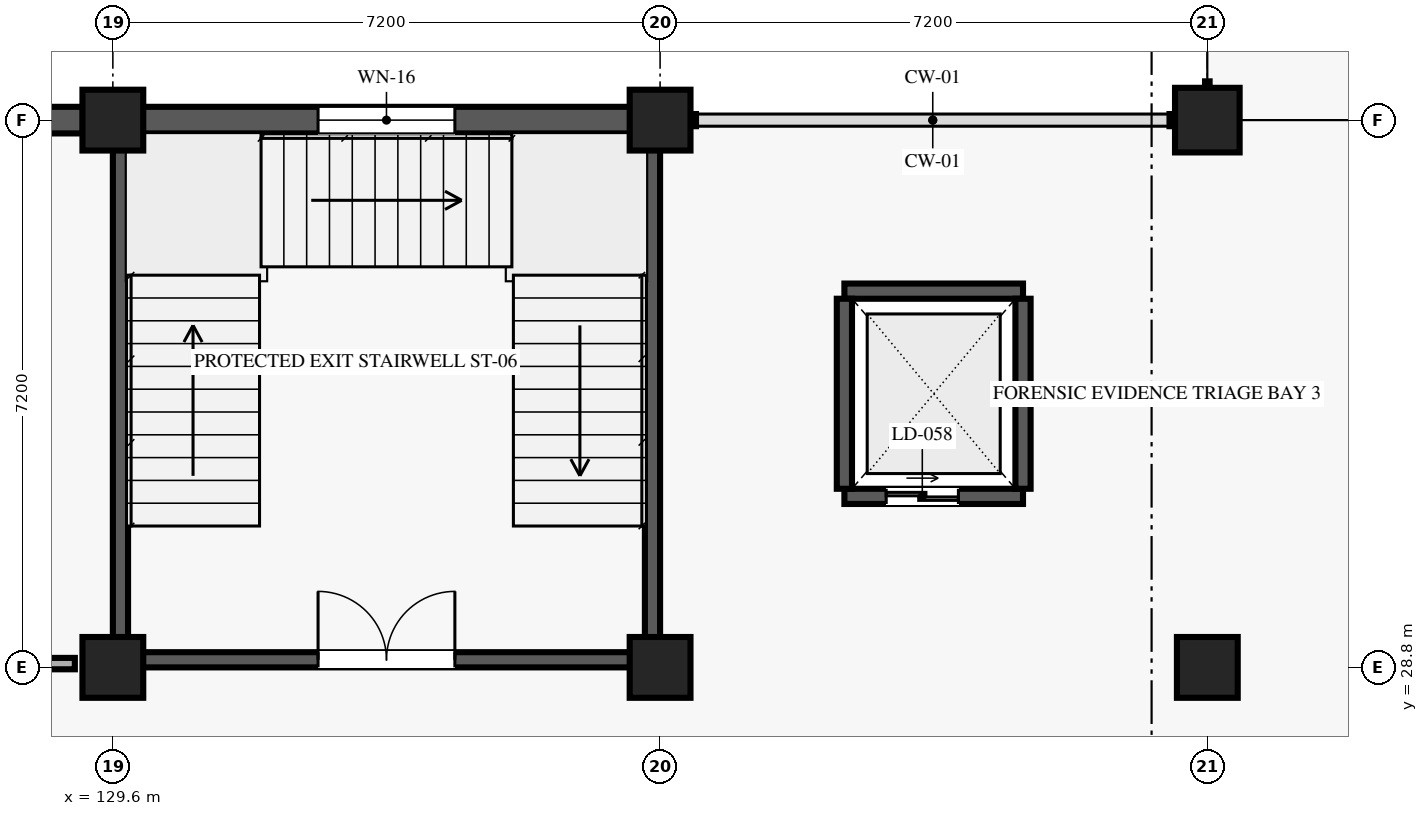
"""IFC4 building model, lengths in metres.
Left out: names, types, materials, properties, quantities, classifications, styles, units other than length and angle.
Written with IfcOpenShell. Run it as: python <this file> out.ifc"""

import sys

from ifc_helpers import new_model, si_unit, direction, frame, frame_2d, origin, origin_2d, place, context, subcontext, project, spatial, rectangle, extrude, element, fill, save


model = new_model("IFC4")
c1 = context("Model", 3, precision=1e-05, world=origin(), true_north=direction((0.0, 1.0)))
c2 = subcontext(c1, "Body", "Model", "MODEL_VIEW")
j1 = project(units=[si_unit("LENGTHUNIT", "METRE"), si_unit("PLANEANGLEUNIT", "RADIAN")], contexts=[c1])
p1 = place(None, origin())
s1 = spatial("IfcSite", under=j1, at=p1, CompositionType="ELEMENT")
p2 = place(p1, origin())
s2 = spatial("IfcBuilding", under=s1, at=p2, CompositionType="ELEMENT")
p3 = place(p2, origin())
s3 = spatial("IfcBuildingStorey", under=s2, at=p3, CompositionType="ELEMENT", Elevation=0.0)
for number, where, z_axis, x_axis in (
    (1, (129.6, 28.8, 0.0), (0.0, 0.0, 1.0), (1.0, 0.0, 0.0)),
    (2, (129.6, 36.0, 0.0), (0.0, 0.0, 1.0), (1.0, 0.0, 0.0)),
    (3, (136.8, 28.8, 0.0), (0.0, 0.0, 1.0), (1.0, 0.0, 0.0)),
    (4, (136.8, 36.0, 0.0), (0.0, 0.0, 1.0), (1.0, 0.0, 0.0)),
    (5, (144.0, 28.8, 0.0), (0.0, 0.0, 1.0), (1.0, 0.0, 0.0)),
):
    element("IfcColumn", number, at=place(p3, frame(where, z_axis=z_axis, x_axis=x_axis)), inside=s3, PredefinedType="COLUMN", context=c2, shape_type="SweptSolid", body=[
        extrude(rectangle(XDim=0.8, YDim=0.8, at=origin_2d()), origin(), (0.0, 0.0, 1.0), 5.4),
    ])
p4 = place(p3, frame((144.0, 36.0, 0.0), z_axis=(0.0, 0.0, 1.0), x_axis=(1.0, 0.0, 0.0)))
e6 = element("IfcColumn", 6, at=p4, inside=s3, PredefinedType="COLUMN", context=c2, shape_type="SweptSolid", body=[
    extrude(rectangle(XDim=0.85, YDim=0.85, at=origin_2d()), origin(), (0.0, 0.0, 1.0), 5.4),
])
p5 = place(p3, frame((122.77, 36.0, 0.0), z_axis=(0.0, 0.0, 1.0), x_axis=(1.0, 0.0, 0.0)))
e7 = element("IfcWall", 7, at=p5, inside=s3, PredefinedType="SOLIDWALL", context=c2, shape_type="SweptSolid", body=[
    extrude(rectangle(XDim=6.435, YDim=0.35, at=frame_2d((3.218, 0.0))), origin(), (0.0, 0.0, 1.0), 5.16),
])
p6 = place(p5, frame((2.468, 0.0, 1.85)))
e8 = element("IfcOpeningElement", 8, at=p6, cuts=e7, PredefinedType="OPENING", context=c2, shape_type="SweptSolid", body=[
    extrude(rectangle(XDim=1.5, YDim=0.7, at=frame_2d((0.75, 0.35))), frame((0.0, 0.185, 0.0), z_axis=(0.0, -1.0, 0.0), x_axis=(1.0, 0.0, 0.0)), (0.0, 0.0, 1.0), 0.37),
])
p7 = place(p3, frame((129.995, 36.0, 0.0), z_axis=(0.0, 0.0, 1.0), x_axis=(1.0, 0.0, 0.0)))
e9 = element("IfcWall", 9, at=p7, inside=s3, PredefinedType="SOLIDWALL", context=c2, shape_type="SweptSolid", body=[
    extrude(rectangle(XDim=6.41, YDim=0.35, at=frame_2d((3.205, 0.0))), origin(), (0.0, 0.0, 1.0), 5.16),
])
p8 = place(p7, frame((2.305, 0.0, 1.85)))
e10 = element("IfcOpeningElement", 10, at=p8, cuts=e9, PredefinedType="OPENING", context=c2, shape_type="SweptSolid", body=[
    extrude(rectangle(XDim=1.8, YDim=0.75, at=frame_2d((0.9, 0.375))), frame((0.0, 0.185, 0.0), z_axis=(0.0, -1.0, 0.0), x_axis=(1.0, 0.0, 0.0)), (0.0, 0.0, 1.0), 0.37),
])
p9 = place(p3, frame((129.8, 28.9, 0.0), z_axis=(0.0, 0.0, 1.0), x_axis=(1.0, 0.0, 0.0)))
e11 = element("IfcWall", 11, at=p9, inside=s3, PredefinedType="SHEAR", context=c2, shape_type="SweptSolid", body=[
    extrude(rectangle(XDim=6.8, YDim=0.2, at=frame_2d((3.4, 0.0))), origin(), (0.0, 0.0, 1.0), 5.16),
])
p10 = place(p9, frame((2.5, 0.0, 0.0)))
e12 = element("IfcOpeningElement", 12, at=p10, cuts=e11, PredefinedType="OPENING", context=c2, shape_type="SweptSolid", body=[
    extrude(rectangle(XDim=1.8, YDim=2.2, at=frame_2d((0.9, 1.1))), frame((0.0, 0.11, 0.0), z_axis=(0.0, -1.0, 0.0), x_axis=(1.0, 0.0, 0.0)), (0.0, 0.0, 1.0), 0.22),
])
for number, where, z_axis, x_axis in (
    (13, (129.7, 29.0, 0.0), (0.0, 0.0, 1.0), (0.0, 1.0, 0.0)),
    (14, (136.7, 29.0, 0.0), (0.0, 0.0, 1.0), (0.0, 1.0, 0.0)),
):
    element("IfcWall", number, at=place(p3, frame(where, z_axis=z_axis, x_axis=x_axis)), inside=s3, PredefinedType="SHEAR", context=c2, shape_type="SweptSolid", body=[
        extrude(rectangle(XDim=6.8, YDim=0.2, at=frame_2d((3.4, 0.0))), origin(), (0.0, 0.0, 1.0), 5.16),
    ])
p11 = place(p3, frame((139.225, 31.05, 0.0), z_axis=(0.0, 0.0, 1.0), x_axis=(1.0, 0.0, 0.0)))
e15 = element("IfcWall", 15, at=p11, inside=s3, PredefinedType="SHEAR", context=c2, shape_type="SweptSolid", body=[
    extrude(rectangle(XDim=2.35, YDim=0.2, at=frame_2d((1.175, 0.0))), origin(), (0.0, 0.0, 1.0), 5.16),
])
p12 = place(p11, frame((0.55, 0.0, 0.0)))
e16 = element("IfcOpeningElement", 16, at=p12, cuts=e15, PredefinedType="OPENING", context=c2, shape_type="SweptSolid", body=[
    extrude(rectangle(XDim=0.95, YDim=2.1, at=frame_2d((0.475, 1.05))), frame((0.0, 0.11, 0.0), z_axis=(0.0, -1.0, 0.0), x_axis=(1.0, 0.0, 0.0)), (0.0, 0.0, 1.0), 0.22),
])
p13 = place(p3, frame((139.225, 33.75, 0.0), z_axis=(0.0, 0.0, 1.0), x_axis=(1.0, 0.0, 0.0)))
e17 = element("IfcWall", 17, at=p13, inside=s3, PredefinedType="SHEAR", context=c2, shape_type="SweptSolid", body=[
    extrude(rectangle(XDim=2.35, YDim=0.2, at=frame_2d((1.175, 0.0))), origin(), (0.0, 0.0, 1.0), 5.16),
])
for number, where, z_axis, x_axis in (
    (18, (139.225, 31.15, 0.0), (0.0, 0.0, 1.0), (0.0, 1.0, 0.0)),
    (19, (141.575, 31.15, 0.0), (0.0, 0.0, 1.0), (0.0, 1.0, 0.0)),
):
    element("IfcWall", number, at=place(p3, frame(where, z_axis=z_axis, x_axis=x_axis)), inside=s3, PredefinedType="SHEAR", context=c2, shape_type="SweptSolid", body=[
        extrude(rectangle(XDim=2.5, YDim=0.2, at=frame_2d((1.25, 0.0))), origin(), (0.0, 0.0, 1.0), 5.16),
    ])
p14 = place(p3, frame((108.65, 28.85, 0.0), z_axis=(0.0, 0.0, 1.0), x_axis=(1.0, 0.0, 0.0)))
e20 = element("IfcWall", 20, at=p14, inside=s3, PredefinedType="PARTITIONING", context=c2, shape_type="SweptSolid", body=[
    extrude(rectangle(XDim=20.45, YDim=0.15, at=frame_2d((10.225, 0.0))), origin(), (0.0, 0.0, 1.0), 4.5),
])
p15 = place(p14, frame((16.794, 0.0, 0.0)))
e21 = element("IfcOpeningElement", 21, at=p15, cuts=e20, PredefinedType="OPENING", context=c2, shape_type="SweptSolid", body=[
    extrude(rectangle(XDim=1.15, YDim=2.15, at=frame_2d((0.575, 1.075))), frame((0.0, 0.085, 0.0), z_axis=(0.0, -1.0, 0.0), x_axis=(1.0, 0.0, 0.0)), (0.0, 0.0, 1.0), 0.17),
])
p16 = place(p8, origin())
e22 = element("IfcWindow", 22, at=p16, inside=s3, PartitioningType="SINGLE_PANEL", PredefinedType="WINDOW", context=c2, shape_type="SweptSolid", body=[
    extrude(rectangle(XDim=1.8, YDim=0.75, at=frame_2d((0.9, 0.375))), frame((0.0, 0.03, 0.0), z_axis=(0.0, -1.0, 0.0), x_axis=(1.0, 0.0, 0.0)), (0.0, 0.0, 1.0), 0.06),
])
fill(e10, e22)
p17 = place(p10, origin())
e23 = element("IfcDoor", 23, at=p17, inside=s3, OperationType="DOUBLE_DOOR_SINGLE_SWING", PredefinedType="DOOR", context=c2, shape_type="SweptSolid", body=[
    extrude(rectangle(XDim=1.8, YDim=2.2, at=frame_2d((0.9, 1.1))), frame((0.0, 0.025, 0.0), z_axis=(0.0, -1.0, 0.0), x_axis=(1.0, 0.0, 0.0)), (0.0, 0.0, 1.0), 0.05),
])
fill(e12, e23)
p18 = place(p12, origin())
e24 = element("IfcDoor", 24, at=p18, inside=s3, OperationType="DOUBLE_DOOR_SLIDING", PredefinedType="DOOR", context=c2, shape_type="SweptSolid", body=[
    extrude(rectangle(XDim=0.95, YDim=2.1, at=frame_2d((0.475, 1.05))), frame((0.0, 0.025, 0.0), z_axis=(0.0, -1.0, 0.0), x_axis=(1.0, 0.0, 0.0)), (0.0, 0.0, 1.0), 0.05),
])
fill(e16, e24)
save(model, sys.argv[1])
